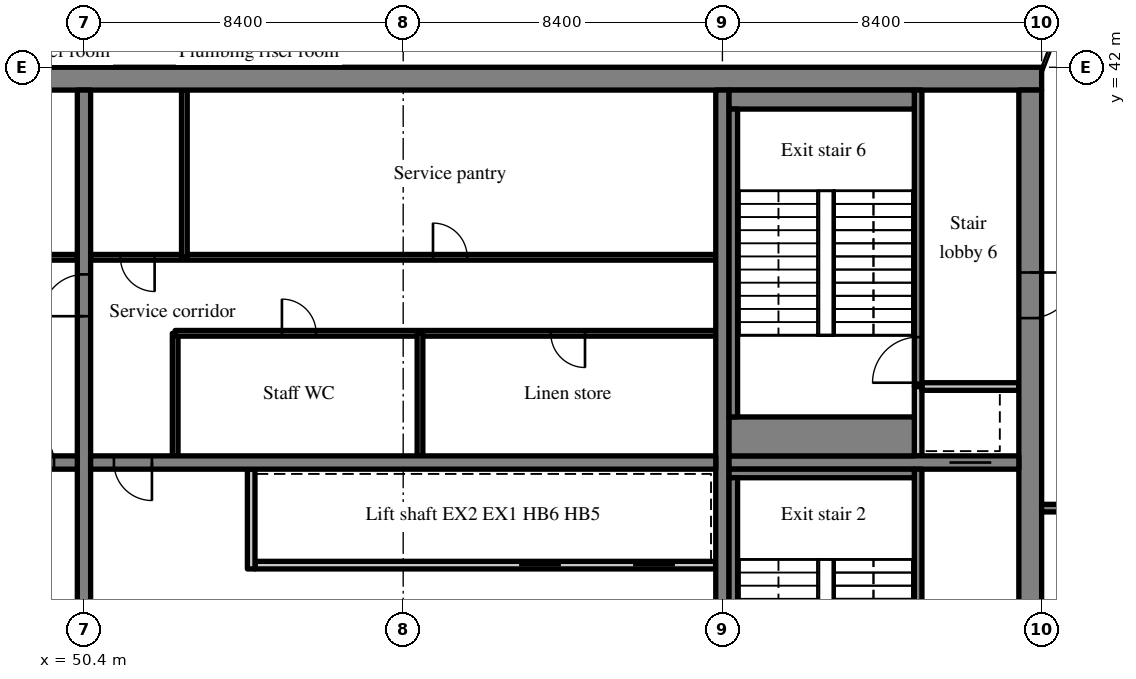
"""IFC4 building model, lengths in metres.
Left out: names, types, materials, properties, quantities, classifications, styles, units other than length and angle.
Written with IfcOpenShell. Run it as: python <this file> out.ifc"""

import sys

from ifc_helpers import new_model, si_unit, direction, frame, frame_2d, origin, place, context, subcontext, project, spatial, rectangle, extrude, source, transform, mapped, element, fill, save


model = new_model("IFC4")
c1 = context("Model", 3, precision=1e-05, world=origin(), true_north=direction((0.0, 1.0)))
c2 = subcontext(c1, "Body", "Model", "MODEL_VIEW")
j1 = project(units=[si_unit("LENGTHUNIT", "METRE"), si_unit("PLANEANGLEUNIT", "RADIAN")], contexts=[c1])
p1 = place(None, origin())
s1 = spatial("IfcSite", under=j1, at=p1, CompositionType="ELEMENT")
p2 = place(p1, origin())
s2 = spatial("IfcBuilding", under=s1, at=p2, CompositionType="ELEMENT")
p3 = place(p2, frame((0.0, 0.0, 253.0)))
s3 = spatial("IfcBuildingStorey", under=s2, at=p3, CompositionType="ELEMENT", Elevation=253.0)
m1 = source(origin(), c2, "Body", "SweptSolid", [
    extrude(rectangle(XDim=50.4, YDim=0.6, at=frame_2d((25.2, 0.0))), origin(), (0.0, 0.0, 1.0), 3.62),
])
p4 = place(p3, frame((25.2, 41.7, 0.0), z_axis=(0.0, 0.0, 1.0), x_axis=(1.0, 0.0, 0.0)))
e1 = element("IfcWall", 1, at=p4, inside=s3, PredefinedType="SHEAR", context=c2, shape_type="MappedRepresentation", body=[
    mapped(m1, transform((0.0, 0.0, 0.0), scale=1.0)),
])
m2 = source(origin(), c2, "Body", "SweptSolid", [
    extrude(rectangle(XDim=18.8, YDim=0.6, at=frame_2d((9.4, 0.0))), origin(), (0.0, 0.0, 1.0), 3.62),
])
p5 = place(p3, frame((75.3, 22.6, 0.0), z_axis=(0.0, 0.0, 1.0), x_axis=(0.0, 1.0, 0.0)))
e2 = element("IfcWall", 2, at=p5, inside=s3, PredefinedType="SHEAR", context=c2, shape_type="MappedRepresentation", body=[
    mapped(m2, transform((0.0, 0.0, 0.0), scale=1.0)),
])
m3 = source(origin(), c2, "Body", "SweptSolid", [
    extrude(rectangle(XDim=1.0, YDim=2.1, at=frame_2d((0.5, 1.05))), frame((0.0, 0.31, 0.0), z_axis=(0.0, -1.0, 0.0), x_axis=(1.0, 0.0, 0.0)), (0.0, 0.0, 1.0), 0.62),
])
p6 = place(p5, frame((2.9, 0.0, 0.0)))
e3 = element("IfcOpeningElement", 3, at=p6, cuts=e2, PredefinedType="OPENING", context=c2, shape_type="MappedRepresentation", body=[
    mapped(m3, transform((0.0, 0.0, 0.0), scale=1.0)),
])
m4 = source(origin(), c2, "Body", "SweptSolid", [
    extrude(rectangle(XDim=1.2, YDim=2.1, at=frame_2d((0.6, 1.05))), frame((0.0, 0.31, 0.0), z_axis=(0.0, -1.0, 0.0), x_axis=(1.0, 0.0, 0.0)), (0.0, 0.0, 1.0), 0.62),
])
p7 = place(p5, frame((12.8, 0.0, 0.0)))
e4 = element("IfcOpeningElement", 4, at=p7, cuts=e2, PredefinedType="OPENING", context=c2, shape_type="MappedRepresentation", body=[
    mapped(m4, transform((0.0, 0.0, 0.0), scale=1.0)),
])
m5 = source(origin(), c2, "Body", "SweptSolid", [
    extrude(rectangle(XDim=18.8, YDim=0.35, at=frame_2d((9.4, 0.0))), origin(), (0.0, 0.0, 1.0), 3.62),
])
p8 = place(p3, frame((50.4, 22.6, 0.0), z_axis=(0.0, 0.0, 1.0), x_axis=(0.0, 1.0, 0.0)))
e5 = element("IfcWall", 5, at=p8, inside=s3, PredefinedType="SHEAR", context=c2, shape_type="MappedRepresentation", body=[
    mapped(m5, transform((0.0, 0.0, 0.0), scale=1.0)),
])
m6 = source(origin(), c2, "Body", "SweptSolid", [
    extrude(rectangle(XDim=1.1, YDim=2.1, at=frame_2d((0.55, 1.05))), frame((0.0, 0.185, 0.0), z_axis=(0.0, -1.0, 0.0), x_axis=(1.0, 0.0, 0.0)), (0.0, 0.0, 1.0), 0.37),
])
p9 = place(p8, frame((12.85, 0.0, 0.0)))
e6 = element("IfcOpeningElement", 6, at=p9, cuts=e5, PredefinedType="OPENING", context=c2, shape_type="MappedRepresentation", body=[
    mapped(m6, transform((0.0, 0.0, 0.0), scale=1.0)),
])
p10 = place(p3, frame((67.2, 22.6, 0.0), z_axis=(0.0, 0.0, 1.0), x_axis=(0.0, 1.0, 0.0)))
e7 = element("IfcWall", 7, at=p10, inside=s3, PredefinedType="SHEAR", context=c2, shape_type="MappedRepresentation", body=[
    mapped(m5, transform((0.0, 0.0, 0.0), scale=1.0)),
])
m7 = source(origin(), c2, "Body", "SweptSolid", [
    extrude(rectangle(XDim=16.45, YDim=0.35, at=frame_2d((8.225, 0.0))), origin(), (0.0, 0.0, 1.0), 3.62),
])
p11 = place(p3, frame((33.775, 31.6, 0.0), z_axis=(0.0, 0.0, 1.0), x_axis=(1.0, 0.0, 0.0)))
e8 = element("IfcWall", 8, at=p11, inside=s3, PredefinedType="SHEAR", context=c2, shape_type="MappedRepresentation", body=[
    mapped(m7, transform((0.0, 0.0, 0.0), scale=1.0)),
])
m8 = source(origin(), c2, "Body", "SweptSolid", [
    extrude(rectangle(XDim=1.0, YDim=2.1, at=frame_2d((0.5, 1.05))), frame((0.0, 0.185, 0.0), z_axis=(0.0, -1.0, 0.0), x_axis=(1.0, 0.0, 0.0)), (0.0, 0.0, 1.0), 0.37),
])
p12 = place(p11, frame((14.837, 0.0, 0.0)))
e9 = element("IfcOpeningElement", 9, at=p12, cuts=e8, PredefinedType="OPENING", context=c2, shape_type="MappedRepresentation", body=[
    mapped(m8, transform((0.0, 0.0, 0.0), scale=1.0)),
])
m9 = source(origin(), c2, "Body", "SweptSolid", [
    extrude(rectangle(XDim=16.45, YDim=0.35, at=frame_2d((8.225, 0.0))), origin(), (0.0, 0.0, 1.0), 3.62),
])
p13 = place(p3, frame((50.575, 31.6, 0.0), z_axis=(0.0, 0.0, 1.0), x_axis=(1.0, 0.0, 0.0)))
e10 = element("IfcWall", 10, at=p13, inside=s3, PredefinedType="SHEAR", context=c2, shape_type="MappedRepresentation", body=[
    mapped(m9, transform((0.0, 0.0, 0.0), scale=1.0)),
])
p14 = place(p13, frame((0.613, 0.0, 0.0)))
e11 = element("IfcOpeningElement", 11, at=p14, cuts=e10, PredefinedType="OPENING", context=c2, shape_type="MappedRepresentation", body=[
    mapped(m8, transform((0.0, 0.0, 0.0), scale=1.0)),
])
m10 = source(origin(), c2, "Body", "SweptSolid", [
    extrude(rectangle(XDim=7.625, YDim=0.35, at=frame_2d((3.812, 0.0))), origin(), (0.0, 0.0, 1.0), 3.62),
])
p15 = place(p3, frame((67.375, 31.6, 0.0), z_axis=(0.0, 0.0, 1.0), x_axis=(1.0, 0.0, 0.0)))
e12 = element("IfcWall", 12, at=p15, inside=s3, PredefinedType="SHEAR", context=c2, shape_type="MappedRepresentation", body=[
    mapped(m10, transform((0.0, 0.0, 0.0), scale=1.0)),
])
p16 = place(p15, frame((5.8, 0.0, 0.0)))
e13 = element("IfcOpeningElement", 13, at=p16, cuts=e12, PredefinedType="OPENING", context=c2, shape_type="MappedRepresentation", body=[
    mapped(m6, transform((0.0, 0.0, 0.0), scale=1.0)),
])
m11 = source(origin(), c2, "Body", "SweptSolid", [
    extrude(rectangle(XDim=16.45, YDim=0.15, at=frame_2d((8.225, 0.0))), origin(), (0.0, 0.0, 1.0), 3.62),
])
p17 = place(p3, frame((33.775, 37.0, 0.0), z_axis=(0.0, 0.0, 1.0), x_axis=(1.0, 0.0, 0.0)))
e14 = element("IfcWall", 14, at=p17, inside=s3, PredefinedType="PARTITIONING", context=c2, shape_type="MappedRepresentation", body=[
    mapped(m11, transform((0.0, 0.0, 0.0), scale=1.0)),
])
m12 = source(origin(), c2, "Body", "SweptSolid", [
    extrude(rectangle(XDim=0.9, YDim=2.1, at=frame_2d((0.45, 1.05))), frame((0.0, 0.085, 0.0), z_axis=(0.0, -1.0, 0.0), x_axis=(1.0, 0.0, 0.0)), (0.0, 0.0, 1.0), 0.17),
])
p18 = place(p17, frame((0.784, 0.0, 0.0)))
e15 = element("IfcOpeningElement", 15, at=p18, cuts=e14, PredefinedType="OPENING", context=c2, shape_type="MappedRepresentation", body=[
    mapped(m12, transform((0.0, 0.0, 0.0), scale=1.0)),
])
p19 = place(p17, frame((3.663, 0.0, 0.0)))
e16 = element("IfcOpeningElement", 16, at=p19, cuts=e14, PredefinedType="OPENING", context=c2, shape_type="MappedRepresentation", body=[
    mapped(m12, transform((0.0, 0.0, 0.0), scale=1.0)),
])
p20 = place(p17, frame((9.42, 0.0, 0.0)))
e17 = element("IfcOpeningElement", 17, at=p20, cuts=e14, PredefinedType="OPENING", context=c2, shape_type="MappedRepresentation", body=[
    mapped(m12, transform((0.0, 0.0, 0.0), scale=1.0)),
])
p21 = place(p17, frame((14.766, 0.0, 0.0)))
e18 = element("IfcOpeningElement", 18, at=p21, cuts=e14, PredefinedType="OPENING", context=c2, shape_type="MappedRepresentation", body=[
    mapped(m12, transform((0.0, 0.0, 0.0), scale=1.0)),
])
m13 = source(origin(), c2, "Body", "SweptSolid", [
    extrude(rectangle(XDim=12.125, YDim=0.2, at=frame_2d((6.062, 0.0))), origin(), (0.0, 0.0, 1.0), 3.62),
])
p22 = place(p3, frame((67.025, 28.9, 0.0), z_axis=(0.0, 0.0, 1.0), x_axis=(-1.0, 0.0, 0.0)))
e19 = element("IfcWall", 19, at=p22, inside=s3, PredefinedType="SOLIDWALL", context=c2, shape_type="MappedRepresentation", body=[
    mapped(m13, transform((0.0, 0.0, 0.0), scale=1.0)),
])
m14 = source(origin(), c2, "Body", "SweptSolid", [
    extrude(rectangle(XDim=1.1, YDim=2.1, at=frame_2d((0.55, 1.05))), frame((0.0, 0.11, 0.0), z_axis=(0.0, -1.0, 0.0), x_axis=(1.0, 0.0, 0.0)), (0.0, 0.0, 1.0), 0.22),
])
p23 = place(p22, frame((1.075, 0.0, 0.0)))
e20 = element("IfcOpeningElement", 20, at=p23, cuts=e19, PredefinedType="OPENING", context=c2, shape_type="MappedRepresentation", body=[
    mapped(m14, transform((0.0, 0.0, 0.0), scale=1.0)),
])
p24 = place(p22, frame((4.075, 0.0, 0.0)))
e21 = element("IfcOpeningElement", 21, at=p24, cuts=e19, PredefinedType="OPENING", context=c2, shape_type="MappedRepresentation", body=[
    mapped(m14, transform((0.0, 0.0, 0.0), scale=1.0)),
])
m15 = source(origin(), c2, "Body", "SweptSolid", [
    extrude(rectangle(XDim=2.625, YDim=0.2, at=frame_2d((1.312, 0.0))), origin(), (0.0, 0.0, 1.0), 3.62),
])
p25 = place(p3, frame((54.8, 28.8, 0.0), z_axis=(0.0, 0.0, 1.0), x_axis=(0.0, 1.0, 0.0)))
e22 = element("IfcWall", 22, at=p25, inside=s3, PredefinedType="SOLIDWALL", context=c2, shape_type="MappedRepresentation", body=[
    mapped(m15, transform((0.0, 0.0, 0.0), scale=1.0)),
])
m16 = source(origin(), c2, "Body", "SweptSolid", [
    extrude(rectangle(XDim=3.225, YDim=0.15, at=frame_2d((1.613, 0.0))), origin(), (0.0, 0.0, 1.0), 3.62),
])
p26 = place(p3, frame((52.8, 31.775, 0.0), z_axis=(0.0, 0.0, 1.0), x_axis=(0.0, 1.0, 0.0)))
e23 = element("IfcWall", 23, at=p26, inside=s3, PredefinedType="PARTITIONING", context=c2, shape_type="MappedRepresentation", body=[
    mapped(m16, transform((0.0, 0.0, 0.0), scale=1.0)),
])
m17 = source(origin(), c2, "Body", "SweptSolid", [
    extrude(rectangle(XDim=14.225, YDim=0.15, at=frame_2d((7.112, 0.0))), origin(), (0.0, 0.0, 1.0), 3.62),
])
p27 = place(p3, frame((67.025, 35.0, 0.0), z_axis=(0.0, 0.0, 1.0), x_axis=(-1.0, 0.0, 0.0)))
e24 = element("IfcWall", 24, at=p27, inside=s3, PredefinedType="PARTITIONING", context=c2, shape_type="MappedRepresentation", body=[
    mapped(m17, transform((0.0, 0.0, 0.0), scale=1.0)),
])
p28 = place(p27, frame((3.441, 0.0, 0.0)))
e25 = element("IfcOpeningElement", 25, at=p28, cuts=e24, PredefinedType="OPENING", context=c2, shape_type="MappedRepresentation", body=[
    mapped(m12, transform((0.0, 0.0, 0.0), scale=1.0)),
])
p29 = place(p27, frame((10.516, 0.0, 0.0)))
e26 = element("IfcOpeningElement", 26, at=p29, cuts=e24, PredefinedType="OPENING", context=c2, shape_type="MappedRepresentation", body=[
    mapped(m12, transform((0.0, 0.0, 0.0), scale=1.0)),
])
m18 = source(origin(), c2, "Body", "SweptSolid", [
    extrude(rectangle(XDim=16.45, YDim=0.15, at=frame_2d((8.225, 0.0))), origin(), (0.0, 0.0, 1.0), 3.62),
])
p30 = place(p3, frame((67.025, 37.0, 0.0), z_axis=(0.0, 0.0, 1.0), x_axis=(-1.0, 0.0, 0.0)))
e27 = element("IfcWall", 27, at=p30, inside=s3, PredefinedType="PARTITIONING", context=c2, shape_type="MappedRepresentation", body=[
    mapped(m18, transform((0.0, 0.0, 0.0), scale=1.0)),
])
p31 = place(p30, frame((6.541, 0.0, 0.0)))
e28 = element("IfcOpeningElement", 28, at=p31, cuts=e27, PredefinedType="OPENING", context=c2, shape_type="MappedRepresentation", body=[
    mapped(m12, transform((0.0, 0.0, 0.0), scale=1.0)),
])
p32 = place(p30, frame((14.766, 0.0, 0.0)))
e29 = element("IfcOpeningElement", 29, at=p32, cuts=e27, PredefinedType="OPENING", context=c2, shape_type="MappedRepresentation", body=[
    mapped(m12, transform((0.0, 0.0, 0.0), scale=1.0)),
])
p33 = place(p3, frame((59.242, 31.775, 0.0), z_axis=(0.0, 0.0, 1.0), x_axis=(0.0, 1.0, 0.0)))
e30 = element("IfcWall", 30, at=p33, inside=s3, PredefinedType="PARTITIONING", context=c2, shape_type="MappedRepresentation", body=[
    mapped(m16, transform((0.0, 0.0, 0.0), scale=1.0)),
])
m19 = source(origin(), c2, "Body", "SweptSolid", [
    extrude(rectangle(XDim=4.4, YDim=0.15, at=frame_2d((2.2, 0.0))), origin(), (0.0, 0.0, 1.0), 3.62),
])
p34 = place(p3, frame((53.042, 37.0, 0.0), z_axis=(0.0, 0.0, 1.0), x_axis=(0.0, 1.0, 0.0)))
e31 = element("IfcWall", 31, at=p34, inside=s3, PredefinedType="PARTITIONING", context=c2, shape_type="MappedRepresentation", body=[
    mapped(m19, transform((0.0, 0.0, 0.0), scale=1.0)),
])
m20 = source(origin(), c2, "Body", "SweptSolid", [
    extrude(rectangle(XDim=8.825, YDim=0.2, at=frame_2d((4.413, 0.0))), origin(), (0.0, 0.0, 1.0), 3.62),
])
p35 = place(p3, frame((72.35, 22.6, 0.0), z_axis=(0.0, 0.0, 1.0), x_axis=(0.0, 1.0, 0.0)))
e32 = element("IfcWall", 32, at=p35, inside=s3, PredefinedType="SOLIDWALL", context=c2, shape_type="MappedRepresentation", body=[
    mapped(m20, transform((0.0, 0.0, 0.0), scale=1.0)),
])
m21 = source(origin(), c2, "Body", "SweptSolid", [
    extrude(rectangle(XDim=1.2, YDim=2.1, at=frame_2d((0.6, 1.05))), frame((0.0, 0.11, 0.0), z_axis=(0.0, -1.0, 0.0), x_axis=(1.0, 0.0, 0.0)), (0.0, 0.0, 1.0), 0.22),
])
p36 = place(p35, frame((1.0, 0.0, 0.0)))
e33 = element("IfcOpeningElement", 33, at=p36, cuts=e32, PredefinedType="OPENING", context=c2, shape_type="MappedRepresentation", body=[
    mapped(m21, transform((0.0, 0.0, 0.0), scale=1.0)),
])
m22 = source(origin(), c2, "Body", "SweptSolid", [
    extrude(rectangle(XDim=1.825, YDim=0.2, at=frame_2d((0.913, 0.0))), origin(), (0.0, 0.0, 1.0), 3.62),
])
p37 = place(p3, frame((72.35, 31.775, 0.0), z_axis=(0.0, 0.0, 1.0), x_axis=(0.0, 1.0, 0.0)))
e34 = element("IfcWall", 34, at=p37, inside=s3, PredefinedType="SOLIDWALL", context=c2, shape_type="MappedRepresentation", body=[
    mapped(m22, transform((0.0, 0.0, 0.0), scale=1.0)),
])
m23 = source(origin(), c2, "Body", "SweptSolid", [
    extrude(rectangle(XDim=2.55, YDim=0.2, at=frame_2d((1.275, 0.0))), origin(), (0.0, 0.0, 1.0), 3.62),
])
p38 = place(p3, frame((72.45, 33.6, 0.0), z_axis=(0.0, 0.0, 1.0), x_axis=(1.0, 0.0, 0.0)))
e35 = element("IfcWall", 35, at=p38, inside=s3, PredefinedType="SOLIDWALL", context=c2, shape_type="MappedRepresentation", body=[
    mapped(m23, transform((0.0, 0.0, 0.0), scale=1.0)),
])
m24 = source(origin(), c2, "Body", "SweptSolid", [
    extrude(rectangle(XDim=7.8, YDim=0.2, at=frame_2d((3.9, 0.0))), origin(), (0.0, 0.0, 1.0), 3.62),
])
p39 = place(p3, frame((72.35, 33.6, 0.0), z_axis=(0.0, 0.0, 1.0), x_axis=(0.0, 1.0, 0.0)))
e36 = element("IfcWall", 36, at=p39, inside=s3, PredefinedType="SOLIDWALL", context=c2, shape_type="MappedRepresentation", body=[
    mapped(m24, transform((0.0, 0.0, 0.0), scale=1.0)),
])
p40 = place(p39, frame((0.1, 0.0, 0.0)))
e37 = element("IfcOpeningElement", 37, at=p40, cuts=e36, PredefinedType="OPENING", context=c2, shape_type="MappedRepresentation", body=[
    mapped(m21, transform((0.0, 0.0, 0.0), scale=1.0)),
])
m25 = source(origin(), c2, "Body", "SweptSolid", [
    extrude(rectangle(XDim=8.1, YDim=0.2, at=frame_2d((4.05, 0.0))), origin(), (0.0, 0.0, 1.0), 3.62),
])
p41 = place(p3, frame((83.7, 30.4, 0.0), z_axis=(0.0, 0.0, 1.0), x_axis=(-1.0, 0.0, 0.0)))
e38 = element("IfcWall", 38, at=p41, inside=s3, PredefinedType="SOLIDWALL", context=c2, shape_type="MappedRepresentation", body=[
    mapped(m25, transform((0.0, 0.0, 0.0), scale=1.0)),
])
m26 = source(origin(), c2, "Body", "SweptSolid", [
    extrude(rectangle(XDim=1.0, YDim=2.1, at=frame_2d((0.5, 1.05))), frame((0.0, 0.11, 0.0), z_axis=(0.0, -1.0, 0.0), x_axis=(1.0, 0.0, 0.0)), (0.0, 0.0, 1.0), 0.22),
])
p42 = place(p41, frame((6.0, 0.0, 0.0)))
e39 = element("IfcOpeningElement", 39, at=p42, cuts=e38, PredefinedType="OPENING", context=c2, shape_type="MappedRepresentation", body=[
    mapped(m26, transform((0.0, 0.0, 0.0), scale=1.0)),
])
m27 = source(origin(), c2, "Body", "SweptSolid", [
    extrude(rectangle(XDim=4.875, YDim=0.225, at=frame_2d((2.438, 0.0))), origin(), (0.0, 0.0, 1.0), 3.62),
])
p43 = place(p3, frame((67.375, 31.312, 0.0), z_axis=(0.0, 0.0, 1.0), x_axis=(1.0, 0.0, 0.0)))
e40 = element("IfcWall", 40, at=p43, inside=s3, PredefinedType="SOLIDWALL", context=c2, shape_type="MappedRepresentation", body=[
    mapped(m27, transform((0.0, 0.0, 0.0), scale=1.0)),
])
m28 = source(origin(), c2, "Body", "SweptSolid", [
    extrude(rectangle(XDim=8.1, YDim=0.225, at=frame_2d((4.05, 0.0))), origin(), (0.0, 0.0, 1.0), 3.62),
])
p44 = place(p3, frame((67.487, 23.1, 0.0), z_axis=(0.0, 0.0, 1.0), x_axis=(0.0, 1.0, 0.0)))
e41 = element("IfcWall", 41, at=p44, inside=s3, PredefinedType="SOLIDWALL", context=c2, shape_type="MappedRepresentation", body=[
    mapped(m28, transform((0.0, 0.0, 0.0), scale=1.0)),
])
m29 = source(origin(), c2, "Body", "SweptSolid", [
    extrude(rectangle(XDim=4.875, YDim=0.5, at=frame_2d((2.438, 0.0))), origin(), (0.0, 0.0, 1.0), 3.62),
])
p45 = place(p3, frame((67.375, 41.15, 0.0), z_axis=(0.0, 0.0, 1.0), x_axis=(1.0, 0.0, 0.0)))
e42 = element("IfcWall", 42, at=p45, inside=s3, PredefinedType="SOLIDWALL", context=c2, shape_type="MappedRepresentation", body=[
    mapped(m29, transform((0.0, 0.0, 0.0), scale=1.0)),
])
m30 = source(origin(), c2, "Body", "SweptSolid", [
    extrude(rectangle(XDim=4.875, YDim=1.025, at=frame_2d((2.438, 0.0))), origin(), (0.0, 0.0, 1.0), 3.62),
])
p46 = place(p3, frame((67.375, 32.287, 0.0), z_axis=(0.0, 0.0, 1.0), x_axis=(1.0, 0.0, 0.0)))
e43 = element("IfcWall", 43, at=p46, inside=s3, PredefinedType="SOLIDWALL", context=c2, shape_type="MappedRepresentation", body=[
    mapped(m30, transform((0.0, 0.0, 0.0), scale=1.0)),
])
p47 = place(p3, frame((67.487, 32.8, 0.0), z_axis=(0.0, 0.0, 1.0), x_axis=(0.0, 1.0, 0.0)))
e44 = element("IfcWall", 44, at=p47, inside=s3, PredefinedType="SOLIDWALL", context=c2, shape_type="MappedRepresentation", body=[
    mapped(m28, transform((0.0, 0.0, 0.0), scale=1.0)),
])
m31 = source(origin(), c2, "Body", "SweptSolid", [
    extrude(rectangle(XDim=1.0, YDim=2.1, at=frame_2d((0.5, 1.05))), frame((0.0, 0.025, 0.0), z_axis=(0.0, -1.0, 0.0), x_axis=(1.0, 0.0, 0.0)), (0.0, 0.0, 1.0), 0.05),
])
p48 = place(p12, origin())
e45 = element("IfcDoor", 45, at=p48, inside=s3, OperationType="SINGLE_SWING_LEFT", PredefinedType="DOOR", context=c2, shape_type="MappedRepresentation", body=[
    mapped(m31, transform((0.0, 0.0, 0.0), scale=1.0)),
])
fill(e9, e45)
p49 = place(p14, origin())
e46 = element("IfcDoor", 46, at=p49, inside=s3, OperationType="SINGLE_SWING_RIGHT", PredefinedType="DOOR", context=c2, shape_type="MappedRepresentation", body=[
    mapped(m31, transform((0.0, 0.0, 0.0), scale=1.0)),
])
fill(e11, e46)
m32 = source(origin(), c2, "Body", "SweptSolid", [
    extrude(rectangle(XDim=1.1, YDim=2.1, at=frame_2d((0.55, 1.05))), frame((0.0, 0.025, 0.0), z_axis=(0.0, -1.0, 0.0), x_axis=(1.0, 0.0, 0.0)), (0.0, 0.0, 1.0), 0.05),
])
p50 = place(p23, origin())
e47 = element("IfcDoor", 47, at=p50, inside=s3, OperationType="SLIDING_TO_RIGHT", PredefinedType="DOOR", context=c2, shape_type="MappedRepresentation", body=[
    mapped(m32, transform((0.0, 0.0, 0.0), scale=1.0)),
])
fill(e20, e47)
p51 = place(p24, origin())
e48 = element("IfcDoor", 48, at=p51, inside=s3, OperationType="SLIDING_TO_LEFT", PredefinedType="DOOR", context=c2, shape_type="MappedRepresentation", body=[
    mapped(m32, transform((0.0, 0.0, 0.0), scale=1.0)),
])
fill(e21, e48)
m33 = source(origin(), c2, "Body", "SweptSolid", [
    extrude(rectangle(XDim=0.9, YDim=2.1, at=frame_2d((0.45, 1.05))), frame((0.0, 0.025, 0.0), z_axis=(0.0, -1.0, 0.0), x_axis=(1.0, 0.0, 0.0)), (0.0, 0.0, 1.0), 0.05),
])
p52 = place(p28, origin())
e49 = element("IfcDoor", 49, at=p52, inside=s3, OperationType="SINGLE_SWING_LEFT", PredefinedType="DOOR", context=c2, shape_type="MappedRepresentation", body=[
    mapped(m33, transform((0.0, 0.0, 0.0), scale=1.0)),
])
fill(e25, e49)
p53 = place(p29, origin())
e50 = element("IfcDoor", 50, at=p53, inside=s3, OperationType="SINGLE_SWING_RIGHT", PredefinedType="DOOR", context=c2, shape_type="MappedRepresentation", body=[
    mapped(m33, transform((0.0, 0.0, 0.0), scale=1.0)),
])
fill(e26, e50)
p54 = place(p31, origin())
e51 = element("IfcDoor", 51, at=p54, inside=s3, OperationType="SINGLE_SWING_RIGHT", PredefinedType="DOOR", context=c2, shape_type="MappedRepresentation", body=[
    mapped(m33, transform((0.0, 0.0, 0.0), scale=1.0)),
])
fill(e28, e51)
p55 = place(p32, origin())
e52 = element("IfcDoor", 52, at=p55, inside=s3, OperationType="SINGLE_SWING_LEFT", PredefinedType="DOOR", context=c2, shape_type="MappedRepresentation", body=[
    mapped(m33, transform((0.0, 0.0, 0.0), scale=1.0)),
])
fill(e29, e52)
p56 = place(p16, origin())
e53 = element("IfcDoor", 53, at=p56, inside=s3, OperationType="SLIDING_TO_RIGHT", PredefinedType="DOOR", context=c2, shape_type="MappedRepresentation", body=[
    mapped(m32, transform((0.0, 0.0, 0.0), scale=1.0)),
])
fill(e13, e53)
m34 = source(origin(), c2, "Body", "SweptSolid", [
    extrude(rectangle(XDim=1.2, YDim=2.1, at=frame_2d((0.6, 1.05))), frame((0.0, 0.025, 0.0), z_axis=(0.0, -1.0, 0.0), x_axis=(1.0, 0.0, 0.0)), (0.0, 0.0, 1.0), 0.05),
])
p57 = place(p40, origin())
e54 = element("IfcDoor", 54, at=p57, inside=s3, OperationType="SINGLE_SWING_LEFT", PredefinedType="DOOR", context=c2, shape_type="MappedRepresentation", body=[
    mapped(m34, transform((0.0, 0.0, 0.0), scale=1.0)),
])
fill(e37, e54)
p58 = place(p7, origin())
e55 = element("IfcDoor", 55, at=p58, inside=s3, OperationType="SINGLE_SWING_RIGHT", PredefinedType="DOOR", context=c2, shape_type="MappedRepresentation", body=[
    mapped(m34, transform((0.0, 0.0, 0.0), scale=1.0)),
])
fill(e4, e55)
p59 = place(p9, origin())
e56 = element("IfcDoor", 56, at=p59, inside=s3, OperationType="SINGLE_SWING_LEFT", PredefinedType="DOOR", context=c2, shape_type="MappedRepresentation", body=[
    mapped(m32, transform((0.0, 0.0, 0.0), scale=1.0)),
])
fill(e6, e56)
save(model, sys.argv[1])
